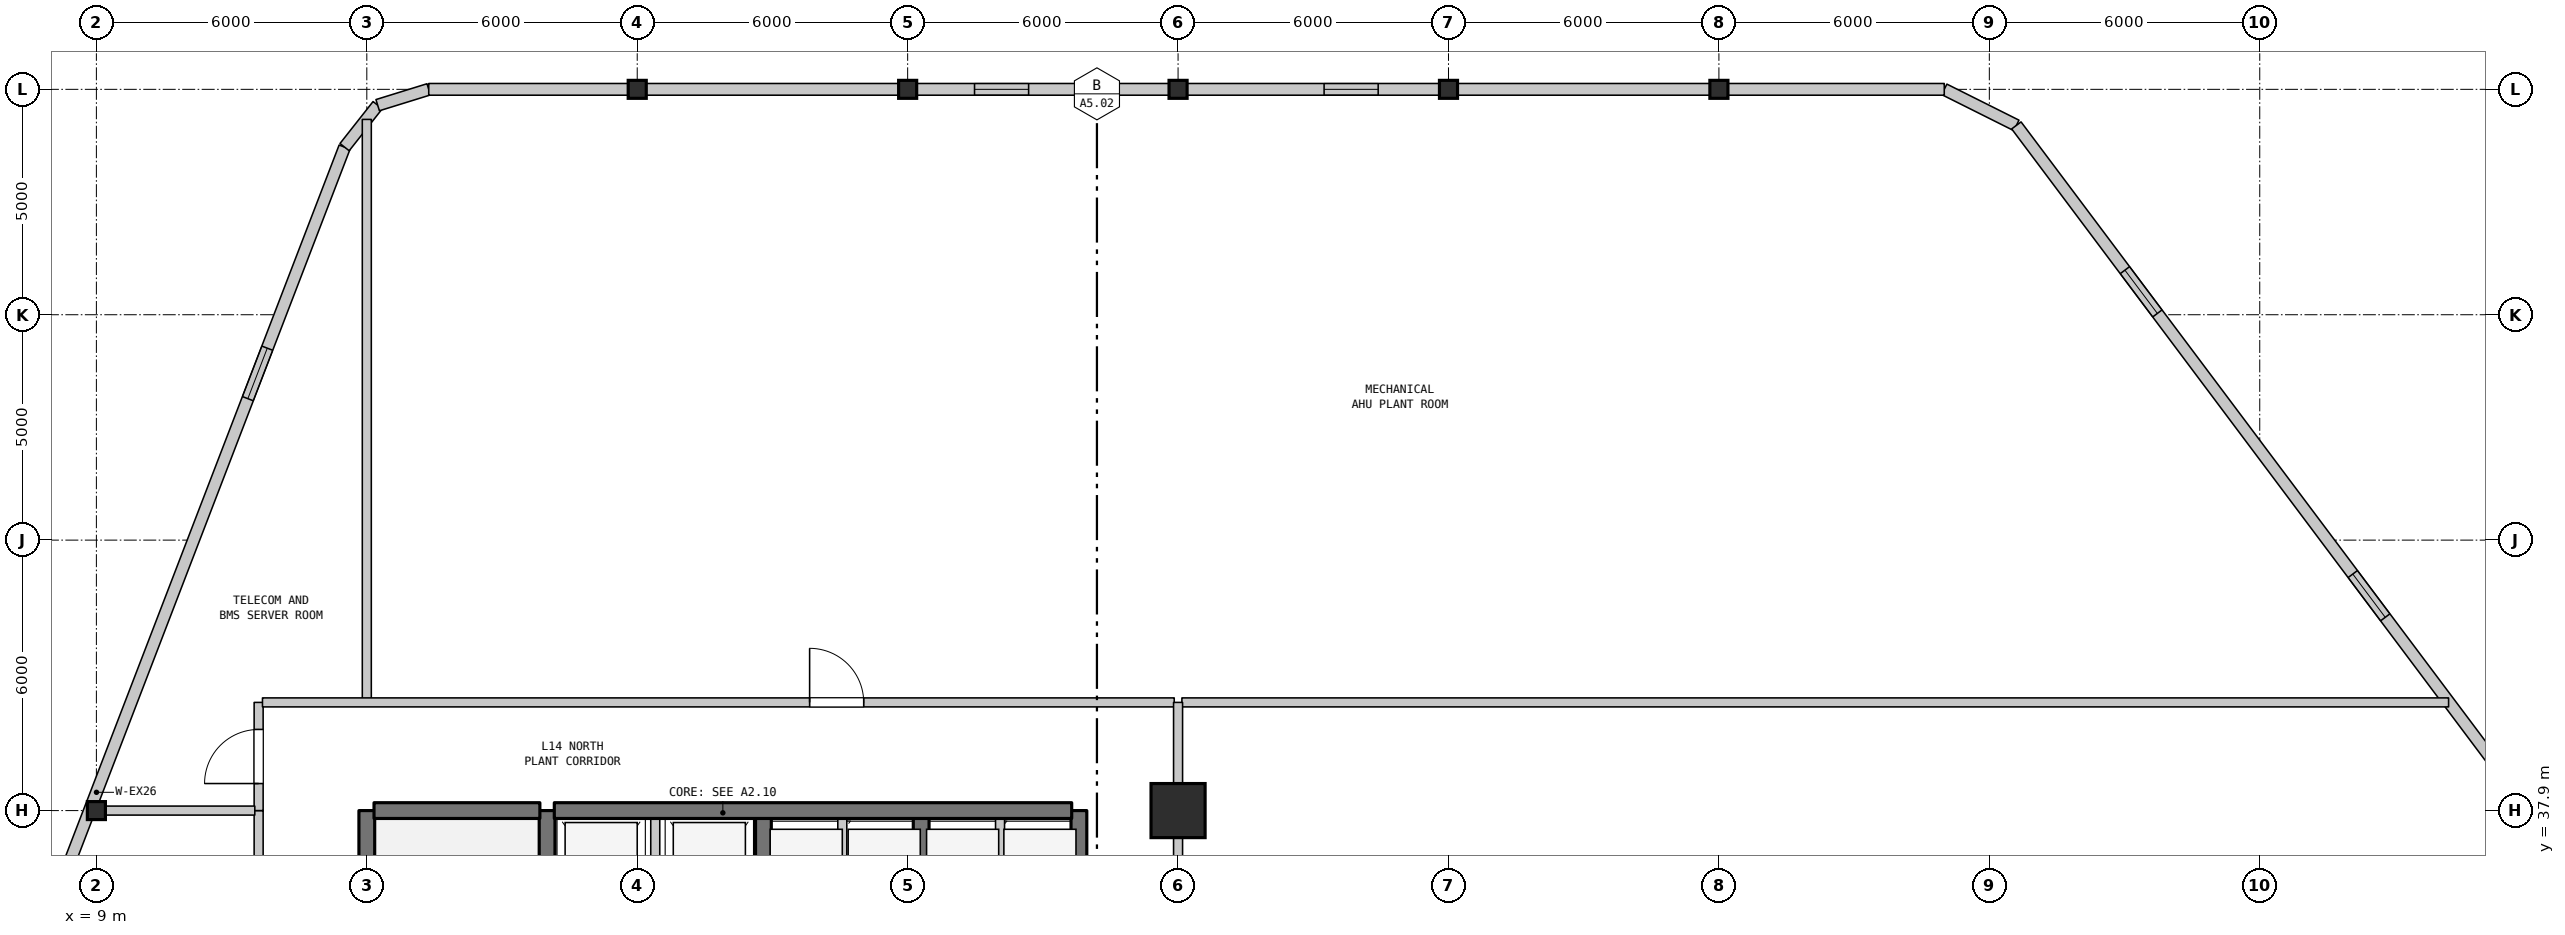
"""IFC4 building model, lengths in metres.
Left out: names, types, materials, properties, quantities, classifications, styles, units other than length and angle.
Written with IfcOpenShell. Run it as: python <this file> out.ifc"""

import sys

from ifc_helpers import new_model, si_unit, direction, frame, frame_2d, origin, origin_2d, place, context, subcontext, project, spatial, rectangle, i_section, extrude, element, fill, save


model = new_model("IFC4")
c1 = context("Model", 3, precision=1e-05, world=origin(), true_north=direction((0.0, 1.0)))
c2 = subcontext(c1, "Body", "Model", "MODEL_VIEW")
j1 = project(units=[si_unit("LENGTHUNIT", "METRE"), si_unit("PLANEANGLEUNIT", "RADIAN")], contexts=[c1])
p1 = place(None, origin())
s1 = spatial("IfcSite", under=j1, at=p1, CompositionType="ELEMENT")
p2 = place(p1, origin())
s2 = spatial("IfcBuilding", under=s1, at=p2, CompositionType="ELEMENT")
p3 = place(p2, frame((0.0, 0.0, 61.0)))
s3 = spatial("IfcBuildingStorey", under=s2, at=p3, CompositionType="ELEMENT", Elevation=61.0)
for number, where, z_axis, x_axis in (
    (1, (9.0, 37.9, 0.0), (0.0, 0.0, 1.0), (1.0, 0.0, 0.0)),
    (2, (21.0, 53.9, 0.0), (0.0, 0.0, 1.0), (1.0, 0.0, 0.0)),
    (3, (27.0, 53.9, 0.0), (0.0, 0.0, 1.0), (1.0, 0.0, 0.0)),
):
    element("IfcColumn", number, at=place(p3, frame(where, z_axis=z_axis, x_axis=x_axis)), inside=s3, PredefinedType="COLUMN", context=c2, shape_type="SweptSolid", body=[
        extrude(i_section(OverallWidth=0.401, OverallDepth=0.399, WebThickness=0.025, FlangeThickness=0.04, FilletRadius=0.015, at=origin_2d()), origin(), (0.0, 0.0, 1.0), 4.6),
    ])
p4 = place(p3, frame((33.0, 37.9, 0.0), z_axis=(0.0, 0.0, 1.0), x_axis=(1.0, 0.0, 0.0)))
e4 = element("IfcColumn", 4, at=p4, inside=s3, PredefinedType="COLUMN", context=c2, shape_type="SweptSolid", body=[
    extrude(rectangle(XDim=1.2, YDim=1.2, at=origin_2d()), origin(), (0.0, 0.0, 1.0), 4.6),
])
for number, where, z_axis, x_axis in (
    (5, (33.0, 53.9, 0.0), (0.0, 0.0, 1.0), (1.0, 0.0, 0.0)),
    (6, (39.0, 53.9, 0.0), (0.0, 0.0, 1.0), (1.0, 0.0, 0.0)),
    (7, (45.0, 53.9, 0.0), (0.0, 0.0, 1.0), (1.0, 0.0, 0.0)),
):
    element("IfcColumn", number, at=place(p3, frame(where, z_axis=z_axis, x_axis=x_axis)), inside=s3, PredefinedType="COLUMN", context=c2, shape_type="SweptSolid", body=[
        extrude(i_section(OverallWidth=0.401, OverallDepth=0.399, WebThickness=0.025, FlangeThickness=0.04, FilletRadius=0.015, at=origin_2d()), origin(), (0.0, 0.0, 1.0), 4.6),
    ])
p5 = place(p3, frame((3.497, 23.993, 0.0), z_axis=(0.0, 0.0, 1.0), x_axis=(0.358990281293, 0.93334129767, 0.0)))
e8 = element("IfcWall", 8, at=p5, inside=s3, PredefinedType="STANDARD", context=c2, shape_type="SweptSolid", body=[
    extrude(rectangle(XDim=30.669, YDim=0.26, at=frame_2d((15.335, 0.0))), origin(), (0.0, 0.0, 1.0), 4.28),
])
p6 = place(p5, frame((4.778, 0.0, 1.1)))
e9 = element("IfcOpeningElement", 9, at=p6, cuts=e8, PredefinedType="OPENING", context=c2, shape_type="SweptSolid", body=[
    extrude(rectangle(XDim=1.2, YDim=1.4, at=frame_2d((0.6, 0.7))), frame((0.0, 0.14, 0.0), z_axis=(0.0, -1.0, 0.0), x_axis=(1.0, 0.0, 0.0)), (0.0, 0.0, 1.0), 0.28),
])
p7 = place(p5, frame((24.691, 0.0, 1.1)))
e10 = element("IfcOpeningElement", 10, at=p7, cuts=e8, PredefinedType="OPENING", context=c2, shape_type="SweptSolid", body=[
    extrude(rectangle(XDim=1.2, YDim=1.4, at=frame_2d((0.6, 0.7))), frame((0.0, 0.14, 0.0), z_axis=(0.0, -1.0, 0.0), x_axis=(1.0, 0.0, 0.0)), (0.0, 0.0, 1.0), 0.28),
])
p8 = place(p3, frame((14.507, 52.618, 0.0), z_axis=(0.0, 0.0, 1.0), x_axis=(0.619003121736, 0.78538852505, 0.0)))
e11 = element("IfcWall", 11, at=p8, inside=s3, PredefinedType="STANDARD", context=c2, shape_type="SweptSolid", body=[
    extrude(rectangle(XDim=1.186, YDim=0.26, at=frame_2d((0.593, 0.0))), origin(), (0.0, 0.0, 1.0), 4.28),
])
p9 = place(p3, frame((15.241, 53.549, 0.0), z_axis=(0.0, 0.0, 1.0), x_axis=(0.955256816454, 0.295777643879, 0.0)))
e12 = element("IfcWall", 12, at=p9, inside=s3, PredefinedType="STANDARD", context=c2, shape_type="SweptSolid", body=[
    extrude(rectangle(XDim=1.186, YDim=0.26, at=frame_2d((0.593, 0.0))), origin(), (0.0, 0.0, 1.0), 4.28),
])
p10 = place(p3, frame((16.374, 53.9, 0.0), z_axis=(0.0, 0.0, 1.0), x_axis=(1.0, 0.0, 0.0)))
e13 = element("IfcWall", 13, at=p10, inside=s3, PredefinedType="STANDARD", context=c2, shape_type="SweptSolid", body=[
    extrude(rectangle(XDim=4.626, YDim=0.26, at=frame_2d((2.313, 0.0))), origin(), (0.0, 0.0, 1.0), 4.28),
])
p11 = place(p3, frame((50.0, 53.9, 0.0), z_axis=(0.0, 0.0, 1.0), x_axis=(0.894481775839, -0.447104409162, 0.0)))
e14 = element("IfcWall", 14, at=p11, inside=s3, PredefinedType="STANDARD", context=c2, shape_type="SweptSolid", body=[
    extrude(rectangle(XDim=1.789, YDim=0.26, at=frame_2d((0.895, 0.0))), origin(), (0.0, 0.0, 1.0), 4.28),
])
p12 = place(p3, frame((51.6, 53.1, 0.0), z_axis=(0.0, 0.0, 1.0), x_axis=(0.6, -0.8, 0.0)))
e15 = element("IfcWall", 15, at=p12, inside=s3, PredefinedType="STANDARD", context=c2, shape_type="SweptSolid", body=[
    extrude(rectangle(XDim=17.655, YDim=0.26, at=frame_2d((8.828, 0.0))), origin(), (0.0, 0.0, 1.0), 4.28),
])
p13 = place(p12, frame((4.014, 0.0, 1.1)))
e16 = element("IfcOpeningElement", 16, at=p13, cuts=e15, PredefinedType="OPENING", context=c2, shape_type="SweptSolid", body=[
    extrude(rectangle(XDim=1.2, YDim=1.4, at=frame_2d((0.6, 0.7))), frame((0.0, 0.14, 0.0), z_axis=(0.0, -1.0, 0.0), x_axis=(1.0, 0.0, 0.0)), (0.0, 0.0, 1.0), 0.28),
])
p14 = place(p12, frame((12.441, 0.0, 1.1)))
e17 = element("IfcOpeningElement", 17, at=p14, cuts=e15, PredefinedType="OPENING", context=c2, shape_type="SweptSolid", body=[
    extrude(rectangle(XDim=1.2, YDim=1.4, at=frame_2d((0.6, 0.7))), frame((0.0, 0.14, 0.0), z_axis=(0.0, -1.0, 0.0), x_axis=(1.0, 0.0, 0.0)), (0.0, 0.0, 1.0), 0.28),
])
p15 = place(p3, frame((12.6, 22.7, 0.0), z_axis=(0.0, 0.0, 1.0), x_axis=(0.0, 1.0, 0.0)))
e18 = element("IfcWall", 18, at=p15, inside=s3, PredefinedType="STANDARD", context=c2, shape_type="SweptSolid", body=[
    extrude(rectangle(XDim=15.2, YDim=0.2, at=frame_2d((7.6, 0.0))), origin(), (0.0, 0.0, 1.0), 4.28),
])
p16 = place(p15, frame((7.0, 0.0, 0.0)))
e19 = element("IfcOpeningElement", 19, at=p16, cuts=e18, PredefinedType="OPENING", context=c2, shape_type="SweptSolid", body=[
    extrude(rectangle(XDim=1.2, YDim=2.2, at=frame_2d((0.6, 1.1))), frame((0.0, 0.11, 0.0), z_axis=(0.0, -1.0, 0.0), x_axis=(1.0, 0.0, 0.0)), (0.0, 0.0, 1.0), 0.22),
])
p17 = place(p3, frame((12.6, 37.9, 0.0), z_axis=(0.0, 0.0, 1.0), x_axis=(0.0, 1.0, 0.0)))
e20 = element("IfcWall", 20, at=p17, inside=s3, PredefinedType="STANDARD", context=c2, shape_type="SweptSolid", body=[
    extrude(rectangle(XDim=2.4, YDim=0.2, at=frame_2d((1.2, 0.0))), origin(), (0.0, 0.0, 1.0), 4.28),
])
p18 = place(p17, frame((0.6, 0.0, 0.0)))
e21 = element("IfcOpeningElement", 21, at=p18, cuts=e20, PredefinedType="OPENING", context=c2, shape_type="SweptSolid", body=[
    extrude(rectangle(XDim=1.2, YDim=2.2, at=frame_2d((0.6, 1.1))), frame((0.0, 0.11, 0.0), z_axis=(0.0, -1.0, 0.0), x_axis=(1.0, 0.0, 0.0)), (0.0, 0.0, 1.0), 0.22),
])
p19 = place(p3, frame((15.0, 31.1, 0.0), z_axis=(0.0, 0.0, 1.0), x_axis=(0.0, 1.0, 0.0)))
e22 = element("IfcWall", 22, at=p19, inside=s3, PredefinedType="SHEAR", context=c2, shape_type="SweptSolid", body=[
    extrude(rectangle(XDim=6.8, YDim=0.35, at=frame_2d((3.4, 0.0))), origin(), (0.0, 0.0, 1.0), 4.28),
])
p20 = place(p3, frame((15.0, 40.3, 0.0), z_axis=(0.0, 0.0, 1.0), x_axis=(0.0, 1.0, 0.0)))
e23 = element("IfcWall", 23, at=p20, inside=s3, PredefinedType="STANDARD", context=c2, shape_type="SweptSolid", body=[
    extrude(rectangle(XDim=12.933, YDim=0.2, at=frame_2d((6.466, 0.0))), origin(), (0.0, 0.0, 1.0), 4.28),
])
p21 = place(p3, frame((19.0, 35.0, 0.0), z_axis=(0.0, 0.0, 1.0), x_axis=(0.0, 1.0, 0.0)))
e24 = element("IfcWall", 24, at=p21, inside=s3, PredefinedType="SHEAR", context=c2, shape_type="SweptSolid", body=[
    extrude(rectangle(XDim=2.9, YDim=0.35, at=frame_2d((1.45, 0.0))), origin(), (0.0, 0.0, 1.0), 4.28),
])
p22 = place(p3, frame((21.4, 35.0, 0.0), z_axis=(0.0, 0.0, 1.0), x_axis=(0.0, 1.0, 0.0)))
e25 = element("IfcWall", 25, at=p22, inside=s3, PredefinedType="STANDARD", context=c2, shape_type="SweptSolid", body=[
    extrude(rectangle(XDim=2.9, YDim=0.2, at=frame_2d((1.45, 0.0))), origin(), (0.0, 0.0, 1.0), 4.28),
])
p23 = place(p3, frame((23.8, 35.0, 0.0), z_axis=(0.0, 0.0, 1.0), x_axis=(0.0, 1.0, 0.0)))
e26 = element("IfcWall", 26, at=p23, inside=s3, PredefinedType="SHEAR", context=c2, shape_type="SweptSolid", body=[
    extrude(rectangle(XDim=2.9, YDim=0.35, at=frame_2d((1.45, 0.0))), origin(), (0.0, 0.0, 1.0), 4.28),
])
p24 = place(p3, frame((25.55, 35.0, 0.0), z_axis=(0.0, 0.0, 1.0), x_axis=(0.0, 1.0, 0.0)))
e27 = element("IfcWall", 27, at=p24, inside=s3, PredefinedType="STANDARD", context=c2, shape_type="SweptSolid", body=[
    extrude(rectangle(XDim=2.9, YDim=0.2, at=frame_2d((1.45, 0.0))), origin(), (0.0, 0.0, 1.0), 4.28),
])
p25 = place(p3, frame((27.3, 35.0, 0.0), z_axis=(0.0, 0.0, 1.0), x_axis=(0.0, 1.0, 0.0)))
e28 = element("IfcWall", 28, at=p25, inside=s3, PredefinedType="SHEAR", context=c2, shape_type="SweptSolid", body=[
    extrude(rectangle(XDim=2.9, YDim=0.35, at=frame_2d((1.45, 0.0))), origin(), (0.0, 0.0, 1.0), 4.28),
])
p26 = place(p3, frame((29.05, 35.0, 0.0), z_axis=(0.0, 0.0, 1.0), x_axis=(0.0, 1.0, 0.0)))
e29 = element("IfcWall", 29, at=p26, inside=s3, PredefinedType="STANDARD", context=c2, shape_type="SweptSolid", body=[
    extrude(rectangle(XDim=2.9, YDim=0.2, at=frame_2d((1.45, 0.0))), origin(), (0.0, 0.0, 1.0), 4.28),
])
p27 = place(p3, frame((30.8, 35.0, 0.0), z_axis=(0.0, 0.0, 1.0), x_axis=(0.0, 1.0, 0.0)))
e30 = element("IfcWall", 30, at=p27, inside=s3, PredefinedType="SHEAR", context=c2, shape_type="SweptSolid", body=[
    extrude(rectangle(XDim=2.9, YDim=0.35, at=frame_2d((1.45, 0.0))), origin(), (0.0, 0.0, 1.0), 4.28),
])
p28 = place(p3, frame((33.0, 28.5, 0.0), z_axis=(0.0, 0.0, 1.0), x_axis=(0.0, 1.0, 0.0)))
e31 = element("IfcWall", 31, at=p28, inside=s3, PredefinedType="STANDARD", context=c2, shape_type="SweptSolid", body=[
    extrude(rectangle(XDim=9.4, YDim=0.2, at=frame_2d((4.7, 0.0))), origin(), (0.0, 0.0, 1.0), 3.78),
])
p29 = place(p28, frame((5.3, 0.0, 0.0)))
e32 = element("IfcOpeningElement", 32, at=p29, cuts=e31, PredefinedType="OPENING", context=c2, shape_type="SweptSolid", body=[
    extrude(rectangle(XDim=1.2, YDim=2.2, at=frame_2d((0.6, 1.1))), frame((0.0, 0.11, 0.0), z_axis=(0.0, -1.0, 0.0), x_axis=(1.0, 0.0, 0.0)), (0.0, 0.0, 1.0), 0.22),
])
p30 = place(p3, frame((8.856, 37.9, 0.0), z_axis=(0.0, 0.0, 1.0), x_axis=(1.0, 0.0, 0.0)))
e33 = element("IfcWall", 33, at=p30, inside=s3, PredefinedType="STANDARD", context=c2, shape_type="SweptSolid", body=[
    extrude(rectangle(XDim=3.659, YDim=0.2, at=frame_2d((1.83, 0.0))), origin(), (0.0, 0.0, 1.0), 3.78),
])
p31 = place(p3, frame((15.16, 37.9, 0.0), z_axis=(0.0, 0.0, 1.0), x_axis=(1.0, 0.0, 0.0)))
e34 = element("IfcWall", 34, at=p31, inside=s3, PredefinedType="SHEAR", context=c2, shape_type="SweptSolid", body=[
    extrude(rectangle(XDim=3.68, YDim=0.35, at=frame_2d((1.84, 0.0))), origin(), (0.0, 0.0, 1.0), 4.28),
])
p32 = place(p3, frame((19.16, 37.9, 0.0), z_axis=(0.0, 0.0, 1.0), x_axis=(1.0, 0.0, 0.0)))
e35 = element("IfcWall", 35, at=p32, inside=s3, PredefinedType="SHEAR", context=c2, shape_type="SweptSolid", body=[
    extrude(rectangle(XDim=11.48, YDim=0.35, at=frame_2d((5.74, 0.0))), origin(), (0.0, 0.0, 1.0), 4.28),
])
p33 = place(p3, frame((12.685, 40.3, 0.0), z_axis=(0.0, 0.0, 1.0), x_axis=(1.0, 0.0, 0.0)))
e36 = element("IfcWall", 36, at=p33, inside=s3, PredefinedType="STANDARD", context=c2, shape_type="SweptSolid", body=[
    extrude(rectangle(XDim=20.23, YDim=0.2, at=frame_2d((10.115, 0.0))), origin(), (0.0, 0.0, 1.0), 4.28),
])
p34 = place(p33, frame((12.14, 0.0, 0.0)))
e37 = element("IfcOpeningElement", 37, at=p34, cuts=e36, PredefinedType="OPENING", context=c2, shape_type="SweptSolid", body=[
    extrude(rectangle(XDim=1.2, YDim=2.2, at=frame_2d((0.6, 1.1))), frame((0.0, 0.11, 0.0), z_axis=(0.0, -1.0, 0.0), x_axis=(1.0, 0.0, 0.0)), (0.0, 0.0, 1.0), 0.22),
])
p35 = place(p3, frame((33.085, 40.3, 0.0), z_axis=(0.0, 0.0, 1.0), x_axis=(1.0, 0.0, 0.0)))
e38 = element("IfcWall", 38, at=p35, inside=s3, PredefinedType="STANDARD", context=c2, shape_type="SweptSolid", body=[
    extrude(rectangle(XDim=28.105, YDim=0.2, at=frame_2d((14.052, 0.0))), origin(), (0.0, 0.0, 1.0), 4.28),
])
p36 = place(p3, frame((21.0, 53.9, 0.0), z_axis=(0.0, 0.0, 1.0), x_axis=(1.0, 0.0, 0.0)))
e39 = element("IfcWall", 39, at=p36, inside=s3, PredefinedType="STANDARD", context=c2, shape_type="SweptSolid", body=[
    extrude(rectangle(XDim=12.0, YDim=0.26, at=frame_2d((6.0, 0.0))), origin(), (0.0, 0.0, 1.0), 3.78),
])
p37 = place(p36, frame((7.484, 0.0, 1.1)))
e40 = element("IfcOpeningElement", 40, at=p37, cuts=e39, PredefinedType="OPENING", context=c2, shape_type="SweptSolid", body=[
    extrude(rectangle(XDim=1.2, YDim=1.4, at=frame_2d((0.6, 0.7))), frame((0.0, 0.14, 0.0), z_axis=(0.0, -1.0, 0.0), x_axis=(1.0, 0.0, 0.0)), (0.0, 0.0, 1.0), 0.28),
])
p38 = place(p3, frame((33.0, 53.9, 0.0), z_axis=(0.0, 0.0, 1.0), x_axis=(1.0, 0.0, 0.0)))
e41 = element("IfcWall", 41, at=p38, inside=s3, PredefinedType="STANDARD", context=c2, shape_type="SweptSolid", body=[
    extrude(rectangle(XDim=6.0, YDim=0.26, at=frame_2d((3.0, 0.0))), origin(), (0.0, 0.0, 1.0), 4.28),
])
p39 = place(p38, frame((3.24, 0.0, 1.1)))
e42 = element("IfcOpeningElement", 42, at=p39, cuts=e41, PredefinedType="OPENING", context=c2, shape_type="SweptSolid", body=[
    extrude(rectangle(XDim=1.2, YDim=1.4, at=frame_2d((0.6, 0.7))), frame((0.0, 0.14, 0.0), z_axis=(0.0, -1.0, 0.0), x_axis=(1.0, 0.0, 0.0)), (0.0, 0.0, 1.0), 0.28),
])
p40 = place(p3, frame((39.0, 53.9, 0.0), z_axis=(0.0, 0.0, 1.0), x_axis=(1.0, 0.0, 0.0)))
e43 = element("IfcWall", 43, at=p40, inside=s3, PredefinedType="STANDARD", context=c2, shape_type="SweptSolid", body=[
    extrude(rectangle(XDim=6.0, YDim=0.26, at=frame_2d((3.0, 0.0))), origin(), (0.0, 0.0, 1.0), 3.78),
])
p41 = place(p3, frame((45.0, 53.9, 0.0), z_axis=(0.0, 0.0, 1.0), x_axis=(1.0, 0.0, 0.0)))
e44 = element("IfcWall", 44, at=p41, inside=s3, PredefinedType="STANDARD", context=c2, shape_type="SweptSolid", body=[
    extrude(rectangle(XDim=5.0, YDim=0.26, at=frame_2d((2.5, 0.0))), origin(), (0.0, 0.0, 1.0), 4.28),
])
p42 = place(p3, frame((33.0, 37.9, 0.0), z_axis=(0.0, 0.0, 1.0), x_axis=(0.0, 1.0, 0.0)))
e45 = element("IfcWall", 45, at=p42, inside=s3, PredefinedType="STANDARD", context=c2, shape_type="SweptSolid", body=[
    extrude(rectangle(XDim=2.4, YDim=0.2, at=frame_2d((1.2, 0.0))), origin(), (0.0, 0.0, 1.0), 3.68),
])
p43 = place(p7, origin())
e46 = element("IfcWindow", 46, at=p43, inside=s3, PartitioningType="SINGLE_PANEL", PredefinedType="WINDOW", context=c2, shape_type="SweptSolid", body=[
    extrude(rectangle(XDim=1.2, YDim=1.4, at=frame_2d((0.6, 0.7))), frame((0.0, 0.03, 0.0), z_axis=(0.0, -1.0, 0.0), x_axis=(1.0, 0.0, 0.0)), (0.0, 0.0, 1.0), 0.06),
])
fill(e10, e46)
p44 = place(p37, origin())
e47 = element("IfcWindow", 47, at=p44, inside=s3, PartitioningType="SINGLE_PANEL", PredefinedType="WINDOW", context=c2, shape_type="SweptSolid", body=[
    extrude(rectangle(XDim=1.2, YDim=1.4, at=frame_2d((0.6, 0.7))), frame((0.0, 0.03, 0.0), z_axis=(0.0, -1.0, 0.0), x_axis=(1.0, 0.0, 0.0)), (0.0, 0.0, 1.0), 0.06),
])
fill(e40, e47)
p45 = place(p39, origin())
e48 = element("IfcWindow", 48, at=p45, inside=s3, PartitioningType="SINGLE_PANEL", PredefinedType="WINDOW", context=c2, shape_type="SweptSolid", body=[
    extrude(rectangle(XDim=1.2, YDim=1.4, at=frame_2d((0.6, 0.7))), frame((0.0, 0.03, 0.0), z_axis=(0.0, -1.0, 0.0), x_axis=(1.0, 0.0, 0.0)), (0.0, 0.0, 1.0), 0.06),
])
fill(e42, e48)
p46 = place(p13, origin())
e49 = element("IfcWindow", 49, at=p46, inside=s3, PartitioningType="SINGLE_PANEL", PredefinedType="WINDOW", context=c2, shape_type="SweptSolid", body=[
    extrude(rectangle(XDim=1.2, YDim=1.4, at=frame_2d((0.6, 0.7))), frame((0.0, 0.03, 0.0), z_axis=(0.0, -1.0, 0.0), x_axis=(1.0, 0.0, 0.0)), (0.0, 0.0, 1.0), 0.06),
])
fill(e16, e49)
p47 = place(p14, origin())
e50 = element("IfcWindow", 50, at=p47, inside=s3, PartitioningType="SINGLE_PANEL", PredefinedType="WINDOW", context=c2, shape_type="SweptSolid", body=[
    extrude(rectangle(XDim=1.2, YDim=1.4, at=frame_2d((0.6, 0.7))), frame((0.0, 0.03, 0.0), z_axis=(0.0, -1.0, 0.0), x_axis=(1.0, 0.0, 0.0)), (0.0, 0.0, 1.0), 0.06),
])
fill(e17, e50)
p48 = place(p18, origin())
e51 = element("IfcDoor", 51, at=p48, inside=s3, OperationType="SINGLE_SWING_LEFT", PredefinedType="DOOR", context=c2, shape_type="SweptSolid", body=[
    extrude(rectangle(XDim=1.2, YDim=2.2, at=frame_2d((0.6, 1.1))), frame((0.0, 0.025, 0.0), z_axis=(0.0, -1.0, 0.0), x_axis=(1.0, 0.0, 0.0)), (0.0, 0.0, 1.0), 0.05),
])
fill(e21, e51)
p49 = place(p34, origin())
e52 = element("IfcDoor", 52, at=p49, inside=s3, OperationType="SINGLE_SWING_LEFT", PredefinedType="DOOR", context=c2, shape_type="SweptSolid", body=[
    extrude(rectangle(XDim=1.2, YDim=2.2, at=frame_2d((0.6, 1.1))), frame((0.0, 0.025, 0.0), z_axis=(0.0, -1.0, 0.0), x_axis=(1.0, 0.0, 0.0)), (0.0, 0.0, 1.0), 0.05),
])
fill(e37, e52)
save(model, sys.argv[1])
